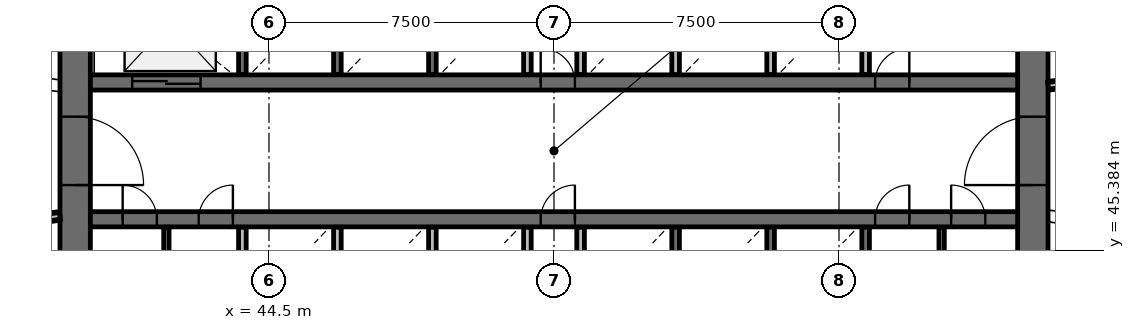
"""IFC4 building model, lengths in metres.
Left out: names, types, materials, properties, quantities, classifications, styles, units other than length and angle.
Written with IfcOpenShell. Run it as: python <this file> out.ifc"""

import sys

from ifc_helpers import new_model, si_unit, direction, frame, frame_2d, origin, place, context, subcontext, project, spatial, rectangle, extrude, source, transform, mapped, element, fill, save


model = new_model("IFC4")
c1 = context("Model", 3, precision=1e-05, world=origin(), true_north=direction((0.0, 1.0)))
c2 = subcontext(c1, "Body", "Model", "MODEL_VIEW")
j1 = project(units=[si_unit("LENGTHUNIT", "METRE"), si_unit("PLANEANGLEUNIT", "RADIAN")], contexts=[c1])
p1 = place(None, origin())
s1 = spatial("IfcSite", under=j1, at=p1, CompositionType="ELEMENT")
p2 = place(p1, origin())
s2 = spatial("IfcBuilding", under=s1, at=p2, CompositionType="ELEMENT")
p3 = place(p2, frame((0.0, 0.0, 129.0)))
s3 = spatial("IfcBuildingStorey", under=s2, at=p3, CompositionType="ELEMENT", Elevation=129.0)
p4 = place(p3, frame((64.6, 38.0, 0.0), z_axis=(0.0, 0.0, 1.0), x_axis=(0.0, 1.0, 0.0)))
e1 = element("IfcWall", 1, at=p4, inside=s3, PredefinedType="SHEAR", context=c2, shape_type="SweptSolid", body=[
    extrude(rectangle(XDim=20.0, YDim=0.8, at=frame_2d((10.0, 0.0))), origin(), (0.0, 0.0, 1.0), 4.1),
])
p5 = place(p4, frame((9.1, 0.0, 0.0)))
e2 = element("IfcOpeningElement", 2, at=p5, cuts=e1, PredefinedType="OPENING", context=c2, shape_type="SweptSolid", body=[
    extrude(rectangle(XDim=1.8, YDim=2.1, at=frame_2d((0.9, 1.05))), frame((0.0, 0.41, 0.0), z_axis=(0.0, -1.0, 0.0), x_axis=(1.0, 0.0, 0.0)), (0.0, 0.0, 1.0), 0.82),
])
p6 = place(p3, frame((39.4, 58.0, 0.0), z_axis=(0.0, 0.0, 1.0), x_axis=(0.0, -1.0, 0.0)))
e3 = element("IfcWall", 3, at=p6, inside=s3, PredefinedType="SHEAR", context=c2, shape_type="SweptSolid", body=[
    extrude(rectangle(XDim=20.0, YDim=0.8, at=frame_2d((10.0, 0.0))), origin(), (0.0, 0.0, 1.0), 4.1),
])
p7 = place(p6, frame((9.1, 0.0, 0.0)))
e4 = element("IfcOpeningElement", 4, at=p7, cuts=e3, PredefinedType="OPENING", context=c2, shape_type="SweptSolid", body=[
    extrude(rectangle(XDim=1.8, YDim=2.1, at=frame_2d((0.9, 1.05))), frame((0.0, 0.41, 0.0), z_axis=(0.0, -1.0, 0.0), x_axis=(1.0, 0.0, 0.0)), (0.0, 0.0, 1.0), 0.82),
])
p8 = place(p3, frame((39.8, 49.8, 0.0), z_axis=(0.0, 0.0, 1.0), x_axis=(1.0, 0.0, 0.0)))
e5 = element("IfcWall", 5, at=p8, inside=s3, PredefinedType="SHEAR", context=c2, shape_type="SweptSolid", body=[
    extrude(rectangle(XDim=24.4, YDim=0.4, at=frame_2d((12.2, 0.0))), origin(), (0.0, 0.0, 1.0), 4.1),
])
p9 = place(p8, frame((1.1, 0.0, 0.0)))
e6 = element("IfcOpeningElement", 6, at=p9, cuts=e5, PredefinedType="OPENING", context=c2, shape_type="SweptSolid", body=[
    extrude(rectangle(XDim=1.8, YDim=2.4, at=frame_2d((0.9, 1.2))), frame((0.0, 0.21, 0.0), z_axis=(0.0, -1.0, 0.0), x_axis=(1.0, 0.0, 0.0)), (0.0, 0.0, 1.0), 0.42),
])
p10 = place(p8, frame((20.65, 0.0, 0.0)))
e7 = element("IfcOpeningElement", 7, at=p10, cuts=e5, PredefinedType="OPENING", context=c2, shape_type="SweptSolid", body=[
    extrude(rectangle(XDim=0.9, YDim=2.1, at=frame_2d((0.45, 1.05))), frame((0.0, 0.21, 0.0), z_axis=(0.0, -1.0, 0.0), x_axis=(1.0, 0.0, 0.0)), (0.0, 0.0, 1.0), 0.42),
])
p11 = place(p8, frame((11.85, 0.0, 0.0)))
e8 = element("IfcOpeningElement", 8, at=p11, cuts=e5, PredefinedType="OPENING", context=c2, shape_type="SweptSolid", body=[
    extrude(rectangle(XDim=0.9, YDim=2.1, at=frame_2d((0.45, 1.05))), frame((0.0, 0.21, 0.0), z_axis=(0.0, -1.0, 0.0), x_axis=(1.0, 0.0, 0.0)), (0.0, 0.0, 1.0), 0.42),
])
p12 = place(p3, frame((39.8, 46.2, 0.0), z_axis=(0.0, 0.0, 1.0), x_axis=(1.0, 0.0, 0.0)))
e9 = element("IfcWall", 9, at=p12, inside=s3, PredefinedType="SHEAR", context=c2, shape_type="SweptSolid", body=[
    extrude(rectangle(XDim=24.4, YDim=0.4, at=frame_2d((12.2, 0.0))), origin(), (0.0, 0.0, 1.0), 4.1),
])
p13 = place(p12, frame((20.65, 0.0, 0.0)))
e10 = element("IfcOpeningElement", 10, at=p13, cuts=e9, PredefinedType="OPENING", context=c2, shape_type="SweptSolid", body=[
    extrude(rectangle(XDim=0.9, YDim=2.1, at=frame_2d((0.45, 1.05))), frame((0.0, 0.21, 0.0), z_axis=(0.0, -1.0, 0.0), x_axis=(1.0, 0.0, 0.0)), (0.0, 0.0, 1.0), 0.42),
])
p14 = place(p12, frame((22.65, 0.0, 0.0)))
e11 = element("IfcOpeningElement", 11, at=p14, cuts=e9, PredefinedType="OPENING", context=c2, shape_type="SweptSolid", body=[
    extrude(rectangle(XDim=0.9, YDim=2.1, at=frame_2d((0.45, 1.05))), frame((0.0, 0.21, 0.0), z_axis=(0.0, -1.0, 0.0), x_axis=(1.0, 0.0, 0.0)), (0.0, 0.0, 1.0), 0.42),
])
p15 = place(p12, frame((0.85, 0.0, 0.0)))
e12 = element("IfcOpeningElement", 12, at=p15, cuts=e9, PredefinedType="OPENING", context=c2, shape_type="SweptSolid", body=[
    extrude(rectangle(XDim=0.9, YDim=2.1, at=frame_2d((0.45, 1.05))), frame((0.0, 0.21, 0.0), z_axis=(0.0, -1.0, 0.0), x_axis=(1.0, 0.0, 0.0)), (0.0, 0.0, 1.0), 0.42),
])
p16 = place(p12, frame((2.85, 0.0, 0.0)))
e13 = element("IfcOpeningElement", 13, at=p16, cuts=e9, PredefinedType="OPENING", context=c2, shape_type="SweptSolid", body=[
    extrude(rectangle(XDim=0.9, YDim=2.1, at=frame_2d((0.45, 1.05))), frame((0.0, 0.21, 0.0), z_axis=(0.0, -1.0, 0.0), x_axis=(1.0, 0.0, 0.0)), (0.0, 0.0, 1.0), 0.42),
])
p17 = place(p12, frame((11.85, 0.0, 0.0)))
e14 = element("IfcOpeningElement", 14, at=p17, cuts=e9, PredefinedType="OPENING", context=c2, shape_type="SweptSolid", body=[
    extrude(rectangle(XDim=0.9, YDim=2.1, at=frame_2d((0.45, 1.05))), frame((0.0, 0.21, 0.0), z_axis=(0.0, -1.0, 0.0), x_axis=(1.0, 0.0, 0.0)), (0.0, 0.0, 1.0), 0.42),
])
for number, where, z_axis, x_axis in (
    (15, (43.8, 45.99, 0.0), (0.0, 0.0, 1.0), (0.0, -1.0, 0.0)),
    (16, (43.8, 52.37, 0.0), (0.0, 0.0, 1.0), (0.0, -1.0, 0.0)),
):
    element("IfcWall", number, at=place(p3, frame(where, z_axis=z_axis, x_axis=x_axis)), inside=s3, PredefinedType="SOLIDWALL", context=c2, shape_type="SweptSolid", body=[
        extrude(rectangle(XDim=2.36, YDim=0.2, at=frame_2d((1.18, 0.0))), origin(), (0.0, 0.0, 1.0), 3.78),
    ])
p18 = place(p3, frame((46.3, 43.6, 0.0), z_axis=(0.0, 0.0, 1.0), x_axis=(0.0, 1.0, 0.0)))
e17 = element("IfcWall", 17, at=p18, inside=s3, PredefinedType="SOLIDWALL", context=c2, shape_type="SweptSolid", body=[
    extrude(rectangle(XDim=2.39, YDim=0.2, at=frame_2d((1.195, 0.0))), origin(), (0.0, 0.0, 1.0), 3.78),
])
for number, where, z_axis, x_axis in (
    (18, (46.3, 50.01, 0.0), (0.0, 0.0, 1.0), (0.0, 1.0, 0.0)),
    (19, (48.8, 43.63, 0.0), (0.0, 0.0, 1.0), (0.0, 1.0, 0.0)),
    (20, (48.8, 50.01, 0.0), (0.0, 0.0, 1.0), (0.0, 1.0, 0.0)),
    (21, (51.3, 43.63, 0.0), (0.0, 0.0, 1.0), (0.0, 1.0, 0.0)),
):
    element("IfcWall", number, at=place(p3, frame(where, z_axis=z_axis, x_axis=x_axis)), inside=s3, PredefinedType="SOLIDWALL", context=c2, shape_type="SweptSolid", body=[
        extrude(rectangle(XDim=2.36, YDim=0.2, at=frame_2d((1.18, 0.0))), origin(), (0.0, 0.0, 1.0), 3.78),
    ])
for number, where, z_axis, x_axis in (
    (22, (51.3, 50.01, 0.0), (0.0, 0.0, 1.0), (0.0, 1.0, 0.0)),
    (23, (52.7, 45.99, 0.0), (0.0, 0.0, 1.0), (0.0, -1.0, 0.0)),
):
    element("IfcWall", number, at=place(p3, frame(where, z_axis=z_axis, x_axis=x_axis)), inside=s3, PredefinedType="SOLIDWALL", context=c2, shape_type="SweptSolid", body=[
        extrude(rectangle(XDim=2.39, YDim=0.2, at=frame_2d((1.195, 0.0))), origin(), (0.0, 0.0, 1.0), 3.78),
    ])
for number, where, z_axis, x_axis in (
    (24, (52.7, 52.37, 0.0), (0.0, 0.0, 1.0), (0.0, -1.0, 0.0)),
    (25, (55.2, 43.63, 0.0), (0.0, 0.0, 1.0), (0.0, 1.0, 0.0)),
    (26, (55.2, 50.01, 0.0), (0.0, 0.0, 1.0), (0.0, 1.0, 0.0)),
    (27, (57.7, 43.63, 0.0), (0.0, 0.0, 1.0), (0.0, 1.0, 0.0)),
):
    element("IfcWall", number, at=place(p3, frame(where, z_axis=z_axis, x_axis=x_axis)), inside=s3, PredefinedType="SOLIDWALL", context=c2, shape_type="SweptSolid", body=[
        extrude(rectangle(XDim=2.36, YDim=0.2, at=frame_2d((1.18, 0.0))), origin(), (0.0, 0.0, 1.0), 3.78),
    ])
p19 = place(p3, frame((57.7, 50.01, 0.0), z_axis=(0.0, 0.0, 1.0), x_axis=(0.0, 1.0, 0.0)))
e28 = element("IfcWall", 28, at=p19, inside=s3, PredefinedType="SOLIDWALL", context=c2, shape_type="SweptSolid", body=[
    extrude(rectangle(XDim=2.39, YDim=0.2, at=frame_2d((1.195, 0.0))), origin(), (0.0, 0.0, 1.0), 3.78),
])
for number, where, z_axis, x_axis in (
    (29, (60.2, 43.63, 0.0), (0.0, 0.0, 1.0), (0.0, 1.0, 0.0)),
    (30, (60.2, 50.01, 0.0), (0.0, 0.0, 1.0), (0.0, 1.0, 0.0)),
):
    element("IfcWall", number, at=place(p3, frame(where, z_axis=z_axis, x_axis=x_axis)), inside=s3, PredefinedType="SOLIDWALL", context=c2, shape_type="SweptSolid", body=[
        extrude(rectangle(XDim=2.36, YDim=0.2, at=frame_2d((1.18, 0.0))), origin(), (0.0, 0.0, 1.0), 3.78),
    ])
p20 = place(p3, frame((67.31, 50.016, 0.0), z_axis=(0.0, 0.0, 1.0), x_axis=(-0.991440737811, -0.130557509967, 0.0)))
e31 = element("IfcWall", 31, at=p20, inside=s3, PredefinedType="PARTITIONING", context=c2, shape_type="SweptSolid", body=[
    extrude(rectangle(XDim=2.33, YDim=0.18, at=frame_2d((1.165, 0.0))), origin(), (0.0, 0.0, 1.0), 2.58),
])
p21 = place(p20, frame((0.48, 0.0, 0.0)))
e32 = element("IfcOpeningElement", 32, at=p21, cuts=e31, PredefinedType="OPENING", context=c2, shape_type="SweptSolid", body=[
    extrude(rectangle(XDim=1.2, YDim=2.1, at=frame_2d((0.6, 1.05))), frame((0.0, 0.1, 0.0), z_axis=(0.0, -1.0, 0.0), x_axis=(1.0, 0.0, 0.0)), (0.0, 0.0, 1.0), 0.2),
])
p22 = place(p3, frame((36.69, 45.984, 0.0), z_axis=(0.0, 0.0, 1.0), x_axis=(0.991440737811, 0.130557509967, 0.0)))
e33 = element("IfcWall", 33, at=p22, inside=s3, PredefinedType="PARTITIONING", context=c2, shape_type="SweptSolid", body=[
    extrude(rectangle(XDim=2.33, YDim=0.18, at=frame_2d((1.165, 0.0))), origin(), (0.0, 0.0, 1.0), 2.58),
])
p23 = place(p22, frame((0.48, 0.0, 0.0)))
e34 = element("IfcOpeningElement", 34, at=p23, cuts=e33, PredefinedType="OPENING", context=c2, shape_type="SweptSolid", body=[
    extrude(rectangle(XDim=1.2, YDim=2.1, at=frame_2d((0.6, 1.05))), frame((0.0, 0.1, 0.0), z_axis=(0.0, -1.0, 0.0), x_axis=(1.0, 0.0, 0.0)), (0.0, 0.0, 1.0), 0.2),
])
for number, where, z_axis, x_axis in (
    (35, (41.8, 43.6, 0.0), (0.0, 0.0, 1.0), (0.0, 1.0, 0.0)),
    (36, (62.2, 43.6, 0.0), (0.0, 0.0, 1.0), (0.0, 1.0, 0.0)),
):
    element("IfcWall", number, at=place(p3, frame(where, z_axis=z_axis, x_axis=x_axis)), inside=s3, PredefinedType="PARTITIONING", context=c2, shape_type="SweptSolid", body=[
        extrude(rectangle(XDim=2.39, YDim=0.14, at=frame_2d((1.195, 0.0))), origin(), (0.0, 0.0, 1.0), 2.98),
    ])
m1 = source(origin(), c2, "Body", "SweptSolid", [
    extrude(rectangle(XDim=1.8, YDim=2.1, at=frame_2d((0.9, 1.05))), frame((0.0, 0.025, 0.0), z_axis=(0.0, -1.0, 0.0), x_axis=(1.0, 0.0, 0.0)), (0.0, 0.0, 1.0), 0.05),
])
p24 = place(p7, origin())
e37 = element("IfcDoor", 37, at=p24, inside=s3, OperationType="SINGLE_SWING_RIGHT", PredefinedType="DOOR", context=c2, shape_type="MappedRepresentation", body=[
    mapped(m1, transform((0.0, 0.0, 0.0), scale=1.0)),
])
fill(e4, e37)
p25 = place(p5, origin())
e38 = element("IfcDoor", 38, at=p25, inside=s3, OperationType="SINGLE_SWING_LEFT", PredefinedType="DOOR", context=c2, shape_type="MappedRepresentation", body=[
    mapped(m1, transform((0.0, 0.0, 0.0), scale=1.0)),
])
fill(e2, e38)
m2 = source(origin(), c2, "Body", "SweptSolid", [
    extrude(rectangle(XDim=1.8, YDim=2.4, at=frame_2d((0.9, 1.2))), frame((0.0, 0.025, 0.0), z_axis=(0.0, -1.0, 0.0), x_axis=(1.0, 0.0, 0.0)), (0.0, 0.0, 1.0), 0.05),
])
p26 = place(p9, origin())
e39 = element("IfcDoor", 39, at=p26, inside=s3, OperationType="DOUBLE_DOOR_SLIDING", PredefinedType="USERDEFINED", context=c2, shape_type="MappedRepresentation", body=[
    mapped(m2, transform((0.0, 0.0, 0.0), scale=1.0)),
])
fill(e6, e39)
m3 = source(origin(), c2, "Body", "SweptSolid", [
    extrude(rectangle(XDim=0.9, YDim=2.1, at=frame_2d((0.45, 1.05))), frame((0.0, 0.025, 0.0), z_axis=(0.0, -1.0, 0.0), x_axis=(1.0, 0.0, 0.0)), (0.0, 0.0, 1.0), 0.05),
])
p27 = place(p13, origin())
e40 = element("IfcDoor", 40, at=p27, inside=s3, OperationType="SINGLE_SWING_RIGHT", PredefinedType="DOOR", context=c2, shape_type="MappedRepresentation", body=[
    mapped(m3, transform((0.0, 0.0, 0.0), scale=1.0)),
])
fill(e10, e40)
p28 = place(p14, origin())
e41 = element("IfcDoor", 41, at=p28, inside=s3, OperationType="SINGLE_SWING_LEFT", PredefinedType="DOOR", context=c2, shape_type="MappedRepresentation", body=[
    mapped(m3, transform((0.0, 0.0, 0.0), scale=1.0)),
])
fill(e11, e41)
p29 = place(p10, origin())
e42 = element("IfcDoor", 42, at=p29, inside=s3, OperationType="SINGLE_SWING_RIGHT", PredefinedType="DOOR", context=c2, shape_type="MappedRepresentation", body=[
    mapped(m3, transform((0.0, 0.0, 0.0), scale=1.0)),
])
fill(e7, e42)
p30 = place(p15, origin())
e43 = element("IfcDoor", 43, at=p30, inside=s3, OperationType="SINGLE_SWING_LEFT", PredefinedType="DOOR", context=c2, shape_type="MappedRepresentation", body=[
    mapped(m3, transform((0.0, 0.0, 0.0), scale=1.0)),
])
fill(e12, e43)
p31 = place(p16, origin())
e44 = element("IfcDoor", 44, at=p31, inside=s3, OperationType="SINGLE_SWING_RIGHT", PredefinedType="DOOR", context=c2, shape_type="MappedRepresentation", body=[
    mapped(m3, transform((0.0, 0.0, 0.0), scale=1.0)),
])
fill(e13, e44)
p32 = place(p11, origin())
e45 = element("IfcDoor", 45, at=p32, inside=s3, OperationType="SINGLE_SWING_LEFT", PredefinedType="DOOR", context=c2, shape_type="MappedRepresentation", body=[
    mapped(m3, transform((0.0, 0.0, 0.0), scale=1.0)),
])
fill(e8, e45)
p33 = place(p17, origin())
e46 = element("IfcDoor", 46, at=p33, inside=s3, OperationType="SINGLE_SWING_RIGHT", PredefinedType="DOOR", context=c2, shape_type="MappedRepresentation", body=[
    mapped(m3, transform((0.0, 0.0, 0.0), scale=1.0)),
])
fill(e14, e46)
save(model, sys.argv[1])
